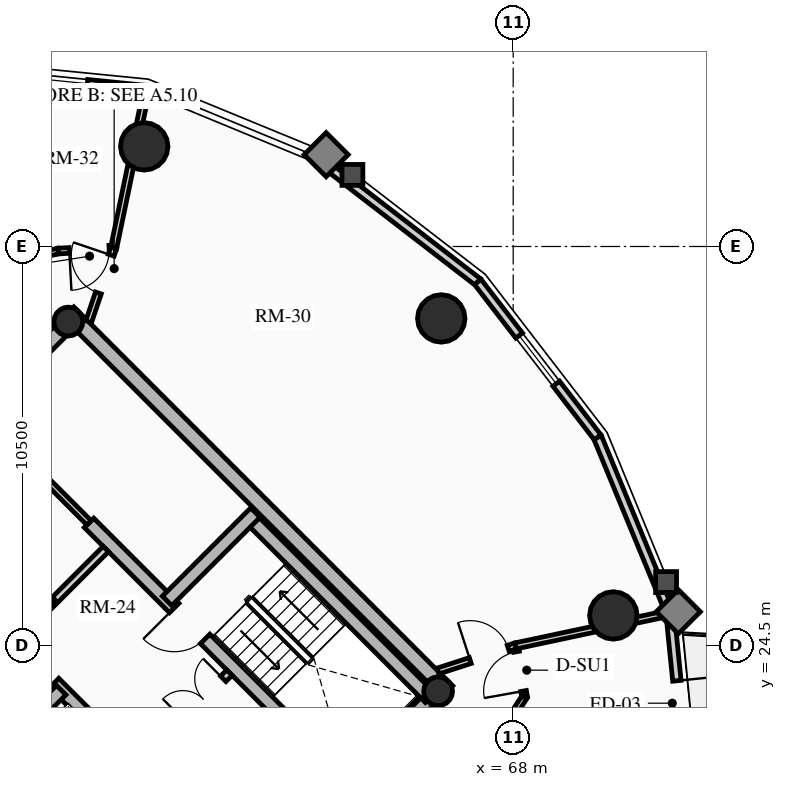
"""IFC4 building model, lengths in metres.
Left out: names, types, materials, properties, quantities, classifications, styles, units other than length and angle.
Written with IfcOpenShell. Run it as: python <this file> out.ifc"""

import sys

from ifc_helpers import new_model, si_unit, direction, frame, frame_2d, origin, origin_2d, place, context, subcontext, project, spatial, rectangle, circle, hollow_circle, extrude, source, transform, mapped, element, fill, save


model = new_model("IFC4")
c1 = context("Model", 3, precision=1e-05, world=origin(), true_north=direction((0.0, 1.0)))
c2 = subcontext(c1, "Body", "Model", "MODEL_VIEW")
j1 = project(units=[si_unit("LENGTHUNIT", "METRE"), si_unit("PLANEANGLEUNIT", "RADIAN")], contexts=[c1])
p1 = place(None, origin())
s1 = spatial("IfcSite", under=j1, at=p1, CompositionType="ELEMENT")
p2 = place(p1, origin())
s2 = spatial("IfcBuilding", under=s1, at=p2, CompositionType="ELEMENT")
p3 = place(p2, frame((0.0, 0.0, 177.79)))
s3 = spatial("IfcBuildingStorey", under=s2, at=p3, CompositionType="ELEMENT", Elevation=177.79)
for number, where, z_axis, x_axis in (
    (1, (58.702, 15.732, 0.0), (0.0, 0.0, 1.0), (-0.707, 0.707, 0.0)),
    (2, (66.268, 23.298, 0.0), (0.0, 0.0, 1.0), (-0.707, 0.707, 0.0)),
):
    element("IfcWall", number, at=place(p3, frame(where, z_axis=z_axis, x_axis=x_axis)), inside=s3, PredefinedType="SHEAR", context=c2, shape_type="SweptSolid", body=[
        extrude(rectangle(XDim=14.1, YDim=0.4, at=frame_2d((7.05, 0.0))), origin(), (0.0, 0.0, 1.0), 2.91),
    ])
p4 = place(p3, frame((58.561, 15.873, 0.0), z_axis=(0.0, 0.0, 1.0), x_axis=(0.707106781187, 0.707106781187, 0.0)))
e3 = element("IfcWall", 3, at=p4, inside=s3, PredefinedType="SHEAR", context=c2, shape_type="SweptSolid", body=[
    extrude(rectangle(XDim=10.7, YDim=0.4, at=frame_2d((5.35, 0.0))), origin(), (0.0, 0.0, 1.0), 2.91),
])
m1 = source(origin(), c2, "Body", "SweptSolid", [
    extrude(rectangle(XDim=1.5, YDim=2.02, at=frame_2d((0.75, 1.01))), frame((0.0, 0.21, 0.0), z_axis=(0.0, -1.0, 0.0), x_axis=(1.0, 0.0, 0.0)), (0.0, 0.0, 1.0), 0.42),
])
p5 = place(p4, frame((5.45, 0.0, 0.0)))
e4 = element("IfcOpeningElement", 4, at=p5, cuts=e3, PredefinedType="OPENING", context=c2, shape_type="MappedRepresentation", body=[
    mapped(m1, transform((0.0, 0.0, 0.0), x_axis=(1.0, 0.0, 0.0), y_axis=(0.0, 1.0, 0.0), z_axis=(0.0, 0.0, 1.0), scale=1.0)),
])
p6 = place(p3, frame((48.873, 25.561, 0.0), z_axis=(0.0, 0.0, 1.0), x_axis=(0.707106781187, 0.707106781187, 0.0)))
e5 = element("IfcWall", 5, at=p6, inside=s3, PredefinedType="SHEAR", context=c2, shape_type="SweptSolid", body=[
    extrude(rectangle(XDim=10.7, YDim=0.4, at=frame_2d((5.35, 0.0))), origin(), (0.0, 0.0, 1.0), 2.91),
])
p7 = place(p6, frame((4.6, 0.0, 0.0)))
e6 = element("IfcOpeningElement", 6, at=p7, cuts=e5, PredefinedType="OPENING", context=c2, shape_type="MappedRepresentation", body=[
    mapped(m1, transform((0.0, 0.0, 0.0), x_axis=(1.0, 0.0, 0.0), y_axis=(0.0, 1.0, 0.0), z_axis=(0.0, 0.0, 1.0), scale=1.0)),
])
p8 = place(p3, frame((61.06, 18.373, 0.0), z_axis=(0.0, 0.0, 1.0), x_axis=(-0.707106781187, 0.707106781187, 0.0)))
e7 = element("IfcWall", 7, at=p8, inside=s3, PredefinedType="SHEAR", context=c2, shape_type="SweptSolid", body=[
    extrude(rectangle(XDim=13.7, YDim=0.35, at=frame_2d((6.85, 0.0))), origin(), (0.0, 0.0, 1.0), 2.91),
])
m2 = source(origin(), c2, "Body", "SweptSolid", [
    extrude(rectangle(XDim=1.1, YDim=2.015, at=frame_2d((0.55, 1.007))), frame((0.0, 0.185, 0.0), z_axis=(0.0, -1.0, 0.0), x_axis=(1.0, 0.0, 0.0)), (0.0, 0.0, 1.0), 0.37),
])
p9 = place(p8, frame((4.85, 0.0, 0.0)))
e8 = element("IfcOpeningElement", 8, at=p9, cuts=e7, PredefinedType="OPENING", context=c2, shape_type="MappedRepresentation", body=[
    mapped(m2, transform((0.0, 0.0, 0.0), x_axis=(1.0, 0.0, 0.0), y_axis=(0.0, 1.0, 0.0), z_axis=(0.0, 0.0, 1.0), scale=1.0)),
])
p10 = place(p8, frame((0.625, 0.0, 0.0)))
e9 = element("IfcOpeningElement", 9, at=p10, cuts=e7, PredefinedType="OPENING", context=c2, shape_type="MappedRepresentation", body=[
    mapped(m2, transform((0.0, 0.0, 0.0), x_axis=(1.0, 0.0, 0.0), y_axis=(0.0, 1.0, 0.0), z_axis=(0.0, 0.0, 1.0), scale=1.0)),
])
p11 = place(p8, frame((2.625, 0.0, 0.0)))
e10 = element("IfcOpeningElement", 10, at=p11, cuts=e7, PredefinedType="OPENING", context=c2, shape_type="MappedRepresentation", body=[
    mapped(m2, transform((0.0, 0.0, 0.0), x_axis=(1.0, 0.0, 0.0), y_axis=(0.0, 1.0, 0.0), z_axis=(0.0, 0.0, 1.0), scale=1.0)),
])
m3 = source(origin(), c2, "Body", "SweptSolid", [
    extrude(rectangle(XDim=1.15, YDim=2.02, at=frame_2d((0.575, 1.01))), frame((0.0, 0.185, 0.0), z_axis=(0.0, -1.0, 0.0), x_axis=(1.0, 0.0, 0.0)), (0.0, 0.0, 1.0), 0.37),
])
p12 = place(p8, frame((7.27, 0.0, 0.0)))
e11 = element("IfcOpeningElement", 11, at=p12, cuts=e7, PredefinedType="OPENING", context=c2, shape_type="MappedRepresentation", body=[
    mapped(m3, transform((0.0, 0.0, 0.0), x_axis=(1.0, 0.0, 0.0), y_axis=(0.0, 1.0, 0.0), z_axis=(0.0, 0.0, 1.0), scale=1.0)),
])
p13 = place(p3, frame((63.627, 20.94, 0.0), z_axis=(0.0, 0.0, 1.0), x_axis=(-0.707119496762, 0.707094065383, 0.0)))
e12 = element("IfcWall", 12, at=p13, inside=s3, PredefinedType="SHEAR", context=c2, shape_type="SweptSolid", body=[
    extrude(rectangle(XDim=9.6, YDim=0.35, at=frame_2d((4.8, 0.0))), origin(), (0.0, 0.0, 1.0), 2.91),
])
p14 = place(p13, frame((5.28, 0.0, 0.0)))
e13 = element("IfcOpeningElement", 13, at=p14, cuts=e12, PredefinedType="OPENING", context=c2, shape_type="MappedRepresentation", body=[
    mapped(m3, transform((0.0, 0.0, 0.0), x_axis=(1.0, 0.0, 0.0), y_axis=(0.0, 1.0, 0.0), z_axis=(0.0, 0.0, 1.0), scale=1.0)),
])
p15 = place(p3, frame((53.784, 21.003, 0.0), z_axis=(0.0, 0.0, 1.0), x_axis=(0.707106781187, 0.707106781187, 0.0)))
e14 = element("IfcWall", 14, at=p15, inside=s3, PredefinedType="SHEAR", context=c2, shape_type="SweptSolid", body=[
    extrude(rectangle(XDim=3.285, YDim=0.35, at=frame_2d((1.643, 0.0))), origin(), (0.0, 0.0, 1.0), 2.91),
])
p16 = place(p3, frame((65.812, 23.125, 0.0), z_axis=(0.0, 0.0, 1.0), x_axis=(-0.707106781187, 0.707106781187, 0.0)))
e15 = element("IfcWall", 15, at=p16, inside=s3, PredefinedType="SHEAR", context=c2, shape_type="SweptSolid", body=[
    extrude(rectangle(XDim=6.695, YDim=0.35, at=frame_2d((3.348, 0.0))), origin(), (0.0, 0.0, 1.0), 2.91),
])
p17 = place(p3, frame((58.893, 25.674, 0.0), z_axis=(0.0, 0.0, 1.0), x_axis=(0.707106781187, 0.707106781187, 0.0)))
e16 = element("IfcWall", 16, at=p17, inside=s3, PredefinedType="SHEAR", context=c2, shape_type="SweptSolid", body=[
    extrude(rectangle(XDim=3.285, YDim=0.35, at=frame_2d((1.643, 0.0))), origin(), (0.0, 0.0, 1.0), 2.91),
])
for number, where, z_axis, x_axis in (
    (17, (66.024, 23.294, 0.0), (0.0, 0.0, 1.0), (0.707, 0.707, 0.0)),
    (18, (56.294, 33.024, 0.0), (0.0, 0.0, 1.0), (0.707, 0.707, 0.0)),
):
    element("IfcColumn", number, at=place(p3, frame(where, z_axis=z_axis, x_axis=x_axis)), inside=s3, PredefinedType="COLUMN", context=c2, shape_type="SweptSolid", body=[
        extrude(hollow_circle(Radius=0.38, WallThickness=0.032, at=origin_2d()), origin(), (0.0, 0.0, 1.0), 2.91),
    ])
for number, where, z_axis, x_axis in (
    (19, (66.107, 33.107, 0.0), (0.0, 0.0, 1.0), (1.0, 0.0, 0.0)),
    (20, (58.291, 37.635, 0.0), (0.0, 0.0, 1.0), (1.0, 0.0, 0.0)),
    (21, (70.635, 25.291, 0.0), (0.0, 0.0, 1.0), (1.0, 0.0, 0.0)),
):
    element("IfcColumn", number, at=place(p3, frame(where, z_axis=z_axis, x_axis=x_axis)), inside=s3, PredefinedType="USERDEFINED", context=c2, shape_type="SweptSolid", body=[
        extrude(circle(Radius=0.625, at=origin_2d()), origin(), (0.0, 0.0, 1.0), 2.91),
    ])
p18 = place(p3, frame((62.979, 37.22, 0.0), z_axis=(0.0, 0.0, 1.0), x_axis=(0.791962560189, -0.610569654715, 0.0)))
e22 = element("IfcWall", 22, at=p18, inside=s3, PredefinedType="SOLIDWALL", context=c2, shape_type="SweptSolid", body=[
    extrude(rectangle(XDim=5.163, YDim=0.22, at=frame_2d((2.582, 0.0))), origin(), (0.0, 0.0, 1.0), 2.245),
])
p19 = place(p3, frame((58.354, 39.127, 0.0), z_axis=(0.0, 0.0, 1.0), x_axis=(0.924556017656, -0.381046152345, 0.0)))
e23 = element("IfcWall", 23, at=p19, inside=s3, PredefinedType="SOLIDWALL", context=c2, shape_type="SweptSolid", body=[
    extrude(rectangle(XDim=0.87, YDim=0.22, at=frame_2d((0.435, 0.0))), origin(), (0.0, 0.0, 1.0), 2.245),
])
p20 = place(p3, frame((53.645, 39.603, 0.0), z_axis=(0.0, 0.0, 1.0), x_axis=(0.994943283129, -0.100438356004, 0.0)))
e24 = element("IfcWall", 24, at=p20, inside=s3, PredefinedType="SOLIDWALL", context=c2, shape_type="SweptSolid", body=[
    extrude(rectangle(XDim=4.733, YDim=0.22, at=frame_2d((2.366, 0.0))), origin(), (0.0, 0.0, 1.0), 2.245),
])
m4 = source(origin(), c2, "Body", "SweptSolid", [
    extrude(rectangle(XDim=1.6, YDim=1.3, at=frame_2d((0.8, 0.65))), frame((0.0, 0.12, 0.0), z_axis=(0.0, -1.0, 0.0), x_axis=(1.0, 0.0, 0.0)), (0.0, 0.0, 1.0), 0.24),
])
p21 = place(p20, frame((1.566, 0.0, 0.65)))
e25 = element("IfcOpeningElement", 25, at=p21, cuts=e24, PredefinedType="OPENING", context=c2, shape_type="MappedRepresentation", body=[
    mapped(m4, transform((0.0, 0.0, 0.0), x_axis=(1.0, 0.0, 0.0), y_axis=(0.0, 1.0, 0.0), z_axis=(0.0, 0.0, 1.0), scale=1.0)),
])
p22 = place(p3, frame((72.127, 25.354, 0.0), z_axis=(0.0, 0.0, 1.0), x_axis=(0.100438356004, -0.994943283129, 0.0)))
e26 = element("IfcWall", 26, at=p22, inside=s3, PredefinedType="SOLIDWALL", context=c2, shape_type="SweptSolid", body=[
    extrude(rectangle(XDim=4.733, YDim=0.22, at=frame_2d((2.366, 0.0))), origin(), (0.0, 0.0, 1.0), 2.245),
])
m5 = source(origin(), c2, "Body", "SweptSolid", [
    extrude(rectangle(XDim=1.15, YDim=2.005, at=frame_2d((0.575, 1.002))), frame((0.0, 0.12, 0.0), z_axis=(0.0, -1.0, 0.0), x_axis=(1.0, 0.0, 0.0)), (0.0, 0.0, 1.0), 0.24),
])
p23 = place(p22, frame((1.791, 0.0, 0.0)))
e27 = element("IfcOpeningElement", 27, at=p23, cuts=e26, PredefinedType="OPENING", context=c2, shape_type="MappedRepresentation", body=[
    mapped(m5, transform((0.0, 0.0, 0.0), x_axis=(1.0, 0.0, 0.0), y_axis=(0.0, 1.0, 0.0), z_axis=(0.0, 0.0, 1.0), scale=1.0)),
])
p24 = place(p3, frame((70.22, 29.979, 0.0), z_axis=(0.0, 0.0, 1.0), x_axis=(0.381196434348, -0.924494066201, 0.0)))
e28 = element("IfcWall", 28, at=p24, inside=s3, PredefinedType="SOLIDWALL", context=c2, shape_type="SweptSolid", body=[
    extrude(rectangle(XDim=5.003, YDim=0.22, at=frame_2d((2.501, 0.0))), origin(), (0.0, 0.0, 1.0), 2.245),
])
p25 = place(p3, frame((67.068, 34.068, 0.0), z_axis=(0.0, 0.0, 1.0), x_axis=(0.610569654715, -0.791962560189, 0.0)))
e29 = element("IfcWall", 29, at=p25, inside=s3, PredefinedType="SOLIDWALL", context=c2, shape_type="SweptSolid", body=[
    extrude(rectangle(XDim=5.163, YDim=0.22, at=frame_2d((2.582, 0.0))), origin(), (0.0, 0.0, 1.0), 2.245),
])
p26 = place(p25, frame((1.782, 0.0, 0.65)))
e30 = element("IfcOpeningElement", 30, at=p26, cuts=e29, PredefinedType="OPENING", context=c2, shape_type="MappedRepresentation", body=[
    mapped(m4, transform((0.0, 0.0, 0.0), x_axis=(1.0, 0.0, 0.0), y_axis=(0.0, 1.0, 0.0), z_axis=(0.0, 0.0, 1.0), scale=1.0)),
])
p27 = place(p3, frame((58.214, 21.467, 0.0), z_axis=(0.0, 0.0, 1.0), x_axis=(0.707106781187, 0.707106781187, 0.0)))
e31 = element("IfcWall", 31, at=p27, inside=s3, PredefinedType="PARTITIONING", context=c2, shape_type="SweptSolid", body=[
    extrude(rectangle(XDim=3.28, YDim=0.2, at=frame_2d((1.64, 0.0))), origin(), (0.0, 0.0, 1.0), 2.675),
])
m6 = source(origin(), c2, "Body", "SweptSolid", [
    extrude(rectangle(XDim=1.5, YDim=2.02, at=frame_2d((0.75, 1.01))), frame((0.0, 0.11, 0.0), z_axis=(0.0, -1.0, 0.0), x_axis=(1.0, 0.0, 0.0)), (0.0, 0.0, 1.0), 0.22),
])
p28 = place(p27, frame((1.55, 0.0, 0.0)))
e32 = element("IfcOpeningElement", 32, at=p28, cuts=e31, PredefinedType="OPENING", context=c2, shape_type="MappedRepresentation", body=[
    mapped(m6, transform((0.0, 0.0, 0.0), x_axis=(1.0, 0.0, 0.0), y_axis=(0.0, 1.0, 0.0), z_axis=(0.0, 0.0, 1.0), scale=1.0)),
])
p29 = place(p3, frame((54.961, 24.719, 0.0), z_axis=(0.0, 0.0, 1.0), x_axis=(0.707106781187, 0.707106781187, 0.0)))
e33 = element("IfcWall", 33, at=p29, inside=s3, PredefinedType="PARTITIONING", context=c2, shape_type="SweptSolid", body=[
    extrude(rectangle(XDim=3.28, YDim=0.2, at=frame_2d((1.64, 0.0))), origin(), (0.0, 0.0, 1.0), 2.675),
])
m7 = source(origin(), c2, "Body", "SweptSolid", [
    extrude(rectangle(XDim=0.9, YDim=2.005, at=frame_2d((0.45, 1.002))), frame((0.0, 0.11, 0.0), z_axis=(0.0, -1.0, 0.0), x_axis=(1.0, 0.0, 0.0)), (0.0, 0.0, 1.0), 0.22),
])
p30 = place(p29, frame((0.16, 0.0, 0.0)))
e34 = element("IfcOpeningElement", 34, at=p30, cuts=e33, PredefinedType="OPENING", context=c2, shape_type="MappedRepresentation", body=[
    mapped(m7, transform((0.0, 0.0, 0.0), x_axis=(1.0, 0.0, 0.0), y_axis=(0.0, 1.0, 0.0), z_axis=(0.0, 0.0, 1.0), scale=1.0)),
])
p31 = place(p3, frame((55.874, 25.631, 0.0), z_axis=(0.0, 0.0, 1.0), x_axis=(-0.707157639372, 0.707055919343, 0.0)))
e35 = element("IfcWall", 35, at=p31, inside=s3, PredefinedType="PARTITIONING", context=c2, shape_type="SweptSolid", body=[
    extrude(rectangle(XDim=2.4, YDim=0.2, at=frame_2d((1.2, 0.0))), origin(), (0.0, 0.0, 1.0), 2.675),
])
p32 = place(p3, frame((56.839, 27.728, 0.0), z_axis=(0.0, 0.0, 1.0), x_axis=(-0.707106781187, 0.707106781187, 0.0)))
e36 = element("IfcWall", 36, at=p32, inside=s3, PredefinedType="PARTITIONING", context=c2, shape_type="SweptSolid", body=[
    extrude(rectangle(XDim=3.9, YDim=0.16, at=frame_2d((1.95, 0.0))), origin(), (0.0, 0.0, 1.0), 2.675),
])
m8 = source(origin(), c2, "Body", "SweptSolid", [
    extrude(rectangle(XDim=0.9, YDim=2.005, at=frame_2d((0.45, 1.002))), frame((0.0, 0.09, 0.0), z_axis=(0.0, -1.0, 0.0), x_axis=(1.0, 0.0, 0.0)), (0.0, 0.0, 1.0), 0.18),
])
p33 = place(p32, frame((2.2, 0.0, 0.0)))
e37 = element("IfcOpeningElement", 37, at=p33, cuts=e36, PredefinedType="OPENING", context=c2, shape_type="MappedRepresentation", body=[
    mapped(m8, transform((0.0, 0.0, 0.0), x_axis=(1.0, 0.0, 0.0), y_axis=(0.0, 1.0, 0.0), z_axis=(0.0, 0.0, 1.0), scale=1.0)),
])
p34 = place(p3, frame((57.486, 34.96, 0.0), z_axis=(0.0, 0.0, 1.0), x_axis=(-0.998483871836, -0.055045051404, 0.0)))
e38 = element("IfcWall", 38, at=p34, inside=s3, PredefinedType="PARTITIONING", context=c2, shape_type="SweptSolid", body=[
    extrude(rectangle(XDim=1.464, YDim=0.15, at=frame_2d((0.732, 0.0))), origin(), (0.0, 0.0, 1.0), 2.245),
])
m9 = source(origin(), c2, "Body", "SweptSolid", [
    extrude(rectangle(XDim=1.05, YDim=2.015, at=frame_2d((0.525, 1.007))), frame((0.0, 0.085, 0.0), z_axis=(0.0, -1.0, 0.0), x_axis=(1.0, 0.0, 0.0)), (0.0, 0.0, 1.0), 0.17),
])
p35 = place(p34, frame((0.12, 0.0, 0.0)))
e39 = element("IfcOpeningElement", 39, at=p35, cuts=e38, PredefinedType="OPENING", context=c2, shape_type="MappedRepresentation", body=[
    mapped(m9, transform((0.0, 0.0, 0.0), x_axis=(1.0, 0.0, 0.0), y_axis=(0.0, 1.0, 0.0), z_axis=(0.0, 0.0, 1.0), scale=1.0)),
])
p36 = place(p3, frame((56.025, 34.88, 0.0), z_axis=(0.0, 0.0, 1.0), x_axis=(-0.975729093394, -0.218981132301, 0.0)))
e40 = element("IfcWall", 40, at=p36, inside=s3, PredefinedType="PARTITIONING", context=c2, shape_type="SweptSolid", body=[
    extrude(rectangle(XDim=1.575, YDim=0.15, at=frame_2d((0.788, 0.0))), origin(), (0.0, 0.0, 1.0), 2.245),
])
p37 = place(p3, frame((67.287, 21.582, 0.0), z_axis=(0.0, 0.0, 1.0), x_axis=(0.543202443884, 0.839601753785, 0.0)))
e41 = element("IfcWall", 41, at=p37, inside=s3, PredefinedType="PARTITIONING", context=c2, shape_type="SweptSolid", body=[
    extrude(rectangle(XDim=1.866, YDim=0.15, at=frame_2d((0.933, 0.0))), origin(), (0.0, 0.0, 1.0), 2.245),
])
p38 = place(p3, frame((68.3, 23.149, 0.0), z_axis=(0.0, 0.0, 1.0), x_axis=(-0.176423554694, 0.984314344785, 0.0)))
e42 = element("IfcWall", 42, at=p38, inside=s3, PredefinedType="PARTITIONING", context=c2, shape_type="SweptSolid", body=[
    extrude(rectangle(XDim=1.362, YDim=0.15, at=frame_2d((0.681, 0.0))), origin(), (0.0, 0.0, 1.0), 2.245),
])
p39 = place(p38, frame((0.156, 0.0, 0.0)))
e43 = element("IfcOpeningElement", 43, at=p39, cuts=e42, PredefinedType="OPENING", context=c2, shape_type="MappedRepresentation", body=[
    mapped(m9, transform((0.0, 0.0, 0.0), x_axis=(1.0, 0.0, 0.0), y_axis=(0.0, 1.0, 0.0), z_axis=(0.0, 0.0, 1.0), scale=1.0)),
])
p40 = place(p3, frame((57.486, 34.96, 0.0), z_axis=(0.0, 0.0, 1.0), x_axis=(0.204011788318, 0.978968431681, 0.0)))
e44 = element("IfcWall", 44, at=p40, inside=s3, PredefinedType="PARTITIONING", context=c2, shape_type="SweptSolid", body=[
    extrude(rectangle(XDim=4.236, YDim=0.16, at=frame_2d((2.118, 0.0))), origin(), (0.0, 0.0, 1.0), 2.245),
])
p41 = place(p3, frame((68.06, 24.489, 0.0), z_axis=(0.0, 0.0, 1.0), x_axis=(0.978089830324, 0.2081832938, 0.0)))
e45 = element("IfcWall", 45, at=p41, inside=s3, PredefinedType="PARTITIONING", context=c2, shape_type="SweptSolid", body=[
    extrude(rectangle(XDim=4.138, YDim=0.16, at=frame_2d((2.069, 0.0))), origin(), (0.0, 0.0, 1.0), 2.245),
])
p42 = place(p3, frame((56.828, 33.021, 0.0), z_axis=(0.0, 0.0, 1.0), x_axis=(0.321300161671, 0.94697740528, 0.0)))
e46 = element("IfcWall", 46, at=p42, inside=s3, PredefinedType="PARTITIONING", context=c2, shape_type="SweptSolid", body=[
    extrude(rectangle(XDim=2.049, YDim=0.16, at=frame_2d((1.024, 0.0))), origin(), (0.0, 0.0, 1.0), 2.245),
])
m10 = source(origin(), c2, "Body", "SweptSolid", [
    extrude(rectangle(XDim=1.05, YDim=2.015, at=frame_2d((0.525, 1.007))), frame((0.0, 0.09, 0.0), z_axis=(0.0, -1.0, 0.0), x_axis=(1.0, 0.0, 0.0)), (0.0, 0.0, 1.0), 0.18),
])
p43 = place(p42, frame((0.798, 0.0, 0.0)))
e47 = element("IfcOpeningElement", 47, at=p43, cuts=e46, PredefinedType="OPENING", context=c2, shape_type="MappedRepresentation", body=[
    mapped(m10, transform((0.0, 0.0, 0.0), x_axis=(1.0, 0.0, 0.0), y_axis=(0.0, 1.0, 0.0), z_axis=(0.0, 0.0, 1.0), scale=1.0)),
])
p44 = place(p3, frame((66.021, 23.828, 0.0), z_axis=(0.0, 0.0, 1.0), x_axis=(0.951292345965, 0.308290240695, 0.0)))
e48 = element("IfcWall", 48, at=p44, inside=s3, PredefinedType="PARTITIONING", context=c2, shape_type="SweptSolid", body=[
    extrude(rectangle(XDim=2.144, YDim=0.16, at=frame_2d((1.072, 0.0))), origin(), (0.0, 0.0, 1.0), 2.245),
])
p45 = place(p44, frame((0.894, 0.0, 0.0)))
e49 = element("IfcOpeningElement", 49, at=p45, cuts=e48, PredefinedType="OPENING", context=c2, shape_type="MappedRepresentation", body=[
    mapped(m10, transform((0.0, 0.0, 0.0), x_axis=(1.0, 0.0, 0.0), y_axis=(0.0, 1.0, 0.0), z_axis=(0.0, 0.0, 1.0), scale=1.0)),
])
m11 = source(origin(), c2, "Body", "SweptSolid", [
    extrude(rectangle(XDim=1.6, YDim=1.3, at=frame_2d((0.8, 0.65))), frame((0.0, 0.03, 0.0), z_axis=(0.0, -1.0, 0.0), x_axis=(1.0, 0.0, 0.0)), (0.0, 0.0, 1.0), 0.06),
])
p46 = place(p21, origin())
e50 = element("IfcWindow", 50, at=p46, inside=s3, PartitioningType="SINGLE_PANEL", PredefinedType="WINDOW", context=c2, shape_type="MappedRepresentation", body=[
    mapped(m11, transform((0.0, 0.0, 0.0), x_axis=(1.0, 0.0, 0.0), y_axis=(0.0, 1.0, 0.0), z_axis=(0.0, 0.0, 1.0), scale=1.0)),
])
fill(e25, e50)
m12 = source(origin(), c2, "Body", "SweptSolid", [
    extrude(rectangle(XDim=1.15, YDim=2.005, at=frame_2d((0.575, 1.002))), frame((0.0, 0.025, 0.0), z_axis=(0.0, -1.0, 0.0), x_axis=(1.0, 0.0, 0.0)), (0.0, 0.0, 1.0), 0.05),
])
p47 = place(p23, origin())
e51 = element("IfcDoor", 51, at=p47, inside=s3, OperationType="SINGLE_SWING_LEFT", PredefinedType="DOOR", context=c2, shape_type="MappedRepresentation", body=[
    mapped(m12, transform((0.0, 0.0, 0.0), x_axis=(1.0, 0.0, 0.0), y_axis=(0.0, 1.0, 0.0), z_axis=(0.0, 0.0, 1.0), scale=1.0)),
])
fill(e27, e51)
p48 = place(p26, origin())
e52 = element("IfcWindow", 52, at=p48, inside=s3, PartitioningType="SINGLE_PANEL", PredefinedType="WINDOW", context=c2, shape_type="MappedRepresentation", body=[
    mapped(m11, transform((0.0, 0.0, 0.0), x_axis=(1.0, 0.0, 0.0), y_axis=(0.0, 1.0, 0.0), z_axis=(0.0, 0.0, 1.0), scale=1.0)),
])
fill(e30, e52)
m13 = source(origin(), c2, "Body", "SweptSolid", [
    extrude(rectangle(XDim=1.15, YDim=2.02, at=frame_2d((0.575, 1.01))), frame((0.0, 0.025, 0.0), z_axis=(0.0, -1.0, 0.0), x_axis=(1.0, 0.0, 0.0)), (0.0, 0.0, 1.0), 0.05),
])
p49 = place(p12, origin())
e53 = element("IfcDoor", 53, at=p49, inside=s3, OperationType="SINGLE_SWING_LEFT", PredefinedType="DOOR", context=c2, shape_type="MappedRepresentation", body=[
    mapped(m13, transform((0.0, 0.0, 0.0), x_axis=(1.0, 0.0, 0.0), y_axis=(0.0, 1.0, 0.0), z_axis=(0.0, 0.0, 1.0), scale=1.0)),
])
fill(e11, e53)
p50 = place(p14, origin())
e54 = element("IfcDoor", 54, at=p50, inside=s3, OperationType="SINGLE_SWING_RIGHT", PredefinedType="DOOR", context=c2, shape_type="MappedRepresentation", body=[
    mapped(m13, transform((0.0, 0.0, 0.0), x_axis=(1.0, 0.0, 0.0), y_axis=(0.0, 1.0, 0.0), z_axis=(0.0, 0.0, 1.0), scale=1.0)),
])
fill(e13, e54)
m14 = source(origin(), c2, "Body", "SweptSolid", [
    extrude(rectangle(XDim=1.5, YDim=2.02, at=frame_2d((0.75, 1.01))), frame((0.0, 0.025, 0.0), z_axis=(0.0, -1.0, 0.0), x_axis=(1.0, 0.0, 0.0)), (0.0, 0.0, 1.0), 0.05),
])
p51 = place(p28, origin())
e55 = element("IfcDoor", 55, at=p51, inside=s3, OperationType="DOUBLE_DOOR_SINGLE_SWING", PredefinedType="DOOR", context=c2, shape_type="MappedRepresentation", body=[
    mapped(m14, transform((0.0, 0.0, 0.0), x_axis=(1.0, 0.0, 0.0), y_axis=(0.0, 1.0, 0.0), z_axis=(0.0, 0.0, 1.0), scale=1.0)),
])
fill(e32, e55)
m15 = source(origin(), c2, "Body", "SweptSolid", [
    extrude(rectangle(XDim=1.05, YDim=2.015, at=frame_2d((0.525, 1.007))), frame((0.0, 0.025, 0.0), z_axis=(0.0, -1.0, 0.0), x_axis=(1.0, 0.0, 0.0)), (0.0, 0.0, 1.0), 0.05),
])
p52 = place(p43, origin())
e56 = element("IfcDoor", 56, at=p52, inside=s3, OperationType="SINGLE_SWING_RIGHT", PredefinedType="DOOR", context=c2, shape_type="MappedRepresentation", body=[
    mapped(m15, transform((0.0, 0.0, 0.0), x_axis=(1.0, 0.0, 0.0), y_axis=(0.0, 1.0, 0.0), z_axis=(0.0, 0.0, 1.0), scale=1.0)),
])
fill(e47, e56)
p53 = place(p45, origin())
e57 = element("IfcDoor", 57, at=p53, inside=s3, OperationType="SINGLE_SWING_LEFT", PredefinedType="DOOR", context=c2, shape_type="MappedRepresentation", body=[
    mapped(m15, transform((0.0, 0.0, 0.0), x_axis=(1.0, 0.0, 0.0), y_axis=(0.0, 1.0, 0.0), z_axis=(0.0, 0.0, 1.0), scale=1.0)),
])
fill(e49, e57)
p54 = place(p35, origin())
e58 = element("IfcDoor", 58, at=p54, inside=s3, OperationType="SINGLE_SWING_RIGHT", PredefinedType="DOOR", context=c2, shape_type="MappedRepresentation", body=[
    mapped(m15, transform((0.0, 0.0, 0.0), x_axis=(1.0, 0.0, 0.0), y_axis=(0.0, 1.0, 0.0), z_axis=(0.0, 0.0, 1.0), scale=1.0)),
])
fill(e39, e58)
p55 = place(p39, origin())
e59 = element("IfcDoor", 59, at=p55, inside=s3, OperationType="SINGLE_SWING_LEFT", PredefinedType="DOOR", context=c2, shape_type="MappedRepresentation", body=[
    mapped(m15, transform((0.0, 0.0, 0.0), x_axis=(1.0, 0.0, 0.0), y_axis=(0.0, 1.0, 0.0), z_axis=(0.0, 0.0, 1.0), scale=1.0)),
])
fill(e43, e59)
save(model, sys.argv[1])
